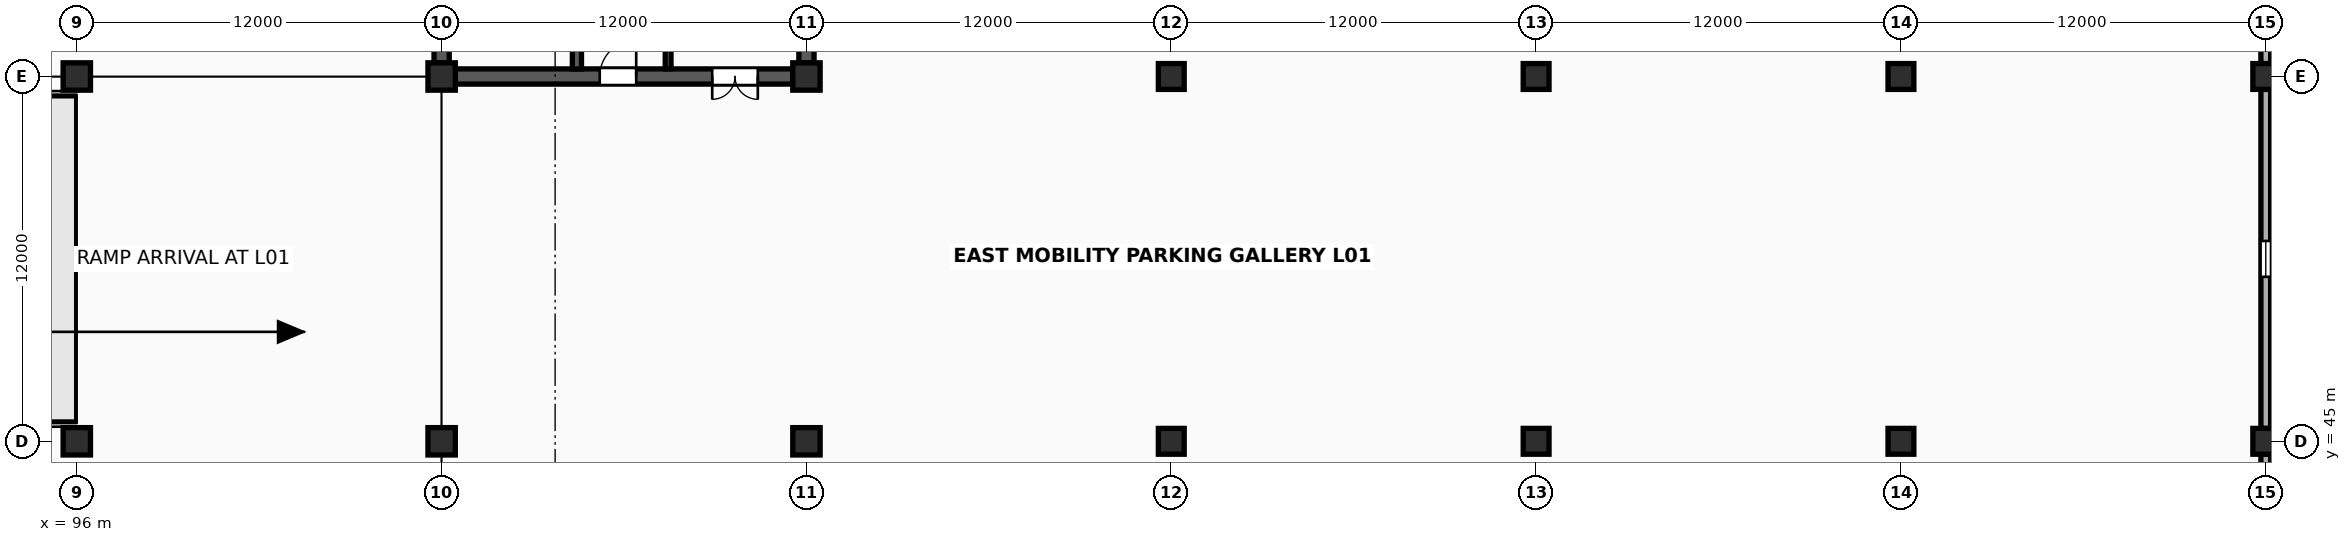
"""IFC4 building model, lengths in metres.
Left out: names, types, materials, properties, quantities, classifications, styles, units other than length and angle.
Written with IfcOpenShell. Run it as: python <this file> out.ifc"""

import sys

from ifc_helpers import new_model, si_unit, direction, frame, frame_2d, origin, origin_2d, place, context, subcontext, project, spatial, rectangle, extrude, element, fill, save


model = new_model("IFC4")
c1 = context("Model", 3, precision=1e-05, world=origin(), true_north=direction((0.0, 1.0)))
c2 = subcontext(c1, "Body", "Model", "MODEL_VIEW")
j1 = project(units=[si_unit("LENGTHUNIT", "METRE"), si_unit("PLANEANGLEUNIT", "RADIAN")], contexts=[c1])
p1 = place(None, origin())
s1 = spatial("IfcSite", under=j1, at=p1, CompositionType="ELEMENT")
p2 = place(p1, origin())
s2 = spatial("IfcBuilding", under=s1, at=p2, CompositionType="ELEMENT")
p3 = place(p2, frame((0.0, 0.0, 5.4)))
s3 = spatial("IfcBuildingStorey", under=s2, at=p3, CompositionType="ELEMENT", Elevation=5.4)
for number, where, z_axis, x_axis in (
    (1, (96.0, 45.0, 0.0), (0.0, 0.0, 1.0), (1.0, 0.0, 0.0)),
    (2, (96.0, 57.0, 0.0), (0.0, 0.0, 1.0), (1.0, 0.0, 0.0)),
    (3, (108.0, 45.0, 0.0), (0.0, 0.0, 1.0), (1.0, 0.0, 0.0)),
    (4, (108.0, 57.0, 0.0), (0.0, 0.0, 1.0), (1.0, 0.0, 0.0)),
    (5, (120.0, 45.0, 0.0), (0.0, 0.0, 1.0), (1.0, 0.0, 0.0)),
    (6, (120.0, 57.0, 0.0), (0.0, 0.0, 1.0), (1.0, 0.0, 0.0)),
):
    element("IfcColumn", number, at=place(p3, frame(where, z_axis=z_axis, x_axis=x_axis)), inside=s3, PredefinedType="COLUMN", context=c2, shape_type="SweptSolid", body=[
        extrude(rectangle(XDim=0.9, YDim=0.9, at=origin_2d()), origin(), (0.0, 0.0, 1.0), 4.2),
    ])
for number, where, z_axis, x_axis in (
    (7, (132.0, 45.0, 0.0), (0.0, 0.0, 1.0), (1.0, 0.0, 0.0)),
    (8, (132.0, 57.0, 0.0), (0.0, 0.0, 1.0), (1.0, 0.0, 0.0)),
    (9, (144.0, 45.0, 0.0), (0.0, 0.0, 1.0), (1.0, 0.0, 0.0)),
    (10, (144.0, 57.0, 0.0), (0.0, 0.0, 1.0), (1.0, 0.0, 0.0)),
    (11, (156.0, 45.0, 0.0), (0.0, 0.0, 1.0), (1.0, 0.0, 0.0)),
    (12, (156.0, 57.0, 0.0), (0.0, 0.0, 1.0), (1.0, 0.0, 0.0)),
    (13, (168.0, 45.0, 0.0), (0.0, 0.0, 1.0), (1.0, 0.0, 0.0)),
    (14, (168.0, 57.0, 0.0), (0.0, 0.0, 1.0), (1.0, 0.0, 0.0)),
):
    element("IfcColumn", number, at=place(p3, frame(where, z_axis=z_axis, x_axis=x_axis)), inside=s3, PredefinedType="COLUMN", context=c2, shape_type="SweptSolid", body=[
        extrude(rectangle(XDim=0.85, YDim=0.85, at=origin_2d()), origin(), (0.0, 0.0, 1.0), 4.2),
    ])
p4 = place(p3, frame((108.447, 57.0, 0.0), z_axis=(0.0, 0.0, 1.0), x_axis=(1.0, 0.0, 0.0)))
e15 = element("IfcWall", 15, at=p4, inside=s3, PredefinedType="SHEAR", context=c2, shape_type="SweptSolid", body=[
    extrude(rectangle(XDim=11.106, YDim=0.5, at=frame_2d((5.553, 0.0))), origin(), (0.0, 0.0, 1.0), 4.043),
])
p5 = place(p4, frame((4.753, 0.0, 0.0)))
e16 = element("IfcOpeningElement", 16, at=p5, cuts=e15, PredefinedType="OPENING", context=c2, shape_type="SweptSolid", body=[
    extrude(rectangle(XDim=1.2, YDim=2.2, at=frame_2d((0.6, 1.1))), frame((0.0, 0.265, 0.0), z_axis=(0.0, -1.0, 0.0), x_axis=(1.0, 0.0, 0.0)), (0.0, 0.0, 1.0), 0.53),
])
p6 = place(p4, frame((8.453, 0.0, 0.0)))
e17 = element("IfcOpeningElement", 17, at=p6, cuts=e15, PredefinedType="OPENING", context=c2, shape_type="SweptSolid", body=[
    extrude(rectangle(XDim=1.5, YDim=2.25, at=frame_2d((0.75, 1.125))), frame((0.0, 0.265, 0.0), z_axis=(0.0, -1.0, 0.0), x_axis=(1.0, 0.0, 0.0)), (0.0, 0.0, 1.0), 0.53),
])
for number, where, z_axis, x_axis in (
    (18, (108.0, 57.447, 0.0), (0.0, 0.0, 1.0), (0.0, 1.0, 0.0)),
    (19, (120.0, 57.447, 0.0), (0.0, 0.0, 1.0), (0.0, 1.0, 0.0)),
):
    element("IfcWall", number, at=place(p3, frame(where, z_axis=z_axis, x_axis=x_axis)), inside=s3, PredefinedType="SHEAR", context=c2, shape_type="SweptSolid", body=[
        extrude(rectangle(XDim=11.106, YDim=0.5, at=frame_2d((5.553, 0.0))), origin(), (0.0, 0.0, 1.0), 4.043),
    ])
p7 = place(p3, frame((112.45, 57.247, 0.0), z_axis=(0.0, 0.0, 1.0), x_axis=(0.0, 1.0, 0.0)))
e20 = element("IfcWall", 20, at=p7, inside=s3, PredefinedType="SHEAR", context=c2, shape_type="SweptSolid", body=[
    extrude(rectangle(XDim=11.506, YDim=0.3, at=frame_2d((5.753, 0.0))), origin(), (0.0, 0.0, 1.0), 4.043),
])
p8 = place(p7, frame((0.9, 0.0, 0.0)))
e21 = element("IfcOpeningElement", 21, at=p8, cuts=e20, PredefinedType="OPENING", context=c2, shape_type="SweptSolid", body=[
    extrude(rectangle(XDim=1.1, YDim=2.2, at=frame_2d((0.55, 1.1))), frame((0.0, 0.165, 0.0), z_axis=(0.0, -1.0, 0.0), x_axis=(1.0, 0.0, 0.0)), (0.0, 0.0, 1.0), 0.33),
])
p9 = place(p3, frame((115.45, 57.25, 0.0), z_axis=(0.0, 0.0, 1.0), x_axis=(0.0, 1.0, 0.0)))
e22 = element("IfcWall", 22, at=p9, inside=s3, PredefinedType="SOLIDWALL", context=c2, shape_type="SweptSolid", body=[
    extrude(rectangle(XDim=8.43, YDim=0.19, at=frame_2d((4.215, 0.0))), origin(), (0.0, 0.0, 1.0), 4.033),
])
p10 = place(p9, frame((3.6, 0.0, 0.0)))
e23 = element("IfcOpeningElement", 23, at=p10, cuts=e22, PredefinedType="OPENING", context=c2, shape_type="SweptSolid", body=[
    extrude(rectangle(XDim=1.04, YDim=2.18, at=frame_2d((0.52, 1.09))), frame((0.0, 0.11, 0.0), z_axis=(0.0, -1.0, 0.0), x_axis=(1.0, 0.0, 0.0)), (0.0, 0.0, 1.0), 0.22),
])
p11 = place(p3, frame((168.0, 36.473, 0.0), z_axis=(0.0, 0.0, 1.0), x_axis=(0.0, 1.0, 0.0)))
e24 = element("IfcWall", 24, at=p11, inside=s3, PredefinedType="SOLIDWALL", context=c2, shape_type="SweptSolid", body=[
    extrude(rectangle(XDim=8.104, YDim=0.32, at=frame_2d((4.052, 0.0))), origin(), (0.0, 0.0, 1.0), 2.69),
])
p12 = place(p11, frame((2.812, 0.0, 0.55)))
e25 = element("IfcOpeningElement", 25, at=p12, cuts=e24, PredefinedType="OPENING", context=c2, shape_type="SweptSolid", body=[
    extrude(rectangle(XDim=2.48, YDim=1.42, at=frame_2d((1.24, 0.71))), frame((0.0, 0.175, 0.0), z_axis=(0.0, -1.0, 0.0), x_axis=(1.0, 0.0, 0.0)), (0.0, 0.0, 1.0), 0.35),
])
p13 = place(p3, frame((168.0, 45.423, 0.0), z_axis=(0.0, 0.0, 1.0), x_axis=(0.0, 1.0, 0.0)))
e26 = element("IfcWall", 26, at=p13, inside=s3, PredefinedType="SOLIDWALL", context=c2, shape_type="SweptSolid", body=[
    extrude(rectangle(XDim=11.154, YDim=0.32, at=frame_2d((5.577, 0.0))), origin(), (0.0, 0.0, 1.0), 2.69),
])
p14 = place(p13, frame((4.987, 0.0, 0.55)))
e27 = element("IfcOpeningElement", 27, at=p14, cuts=e26, PredefinedType="OPENING", context=c2, shape_type="SweptSolid", body=[
    extrude(rectangle(XDim=1.18, YDim=1.58, at=frame_2d((0.59, 0.79))), frame((0.0, 0.175, 0.0), z_axis=(0.0, -1.0, 0.0), x_axis=(1.0, 0.0, 0.0)), (0.0, 0.0, 1.0), 0.35),
])
p15 = place(p3, frame((168.0, 57.423, 0.0), z_axis=(0.0, 0.0, 1.0), x_axis=(0.0, 1.0, 0.0)))
e28 = element("IfcWall", 28, at=p15, inside=s3, PredefinedType="SOLIDWALL", context=c2, shape_type="SweptSolid", body=[
    extrude(rectangle(XDim=11.154, YDim=0.32, at=frame_2d((5.577, 0.0))), origin(), (0.0, 0.0, 1.0), 2.69),
])
p16 = place(p15, frame((4.907, 0.0, 0.55)))
e29 = element("IfcOpeningElement", 29, at=p16, cuts=e28, PredefinedType="OPENING", context=c2, shape_type="SweptSolid", body=[
    extrude(rectangle(XDim=1.34, YDim=1.58, at=frame_2d((0.67, 0.79))), frame((0.0, 0.175, 0.0), z_axis=(0.0, -1.0, 0.0), x_axis=(1.0, 0.0, 0.0)), (0.0, 0.0, 1.0), 0.35),
])
p17 = place(p14, origin())
e30 = element("IfcWindow", 30, at=p17, inside=s3, PartitioningType="SINGLE_PANEL", PredefinedType="WINDOW", context=c2, shape_type="SweptSolid", body=[
    extrude(rectangle(XDim=1.18, YDim=1.58, at=frame_2d((0.59, 0.79))), frame((0.0, 0.03, 0.0), z_axis=(0.0, -1.0, 0.0), x_axis=(1.0, 0.0, 0.0)), (0.0, 0.0, 1.0), 0.06),
])
fill(e27, e30)
p18 = place(p5, origin())
e31 = element("IfcDoor", 31, at=p18, inside=s3, OperationType="SINGLE_SWING_RIGHT", PredefinedType="DOOR", context=c2, shape_type="SweptSolid", body=[
    extrude(rectangle(XDim=1.2, YDim=2.2, at=frame_2d((0.6, 1.1))), frame((0.0, 0.025, 0.0), z_axis=(0.0, -1.0, 0.0), x_axis=(1.0, 0.0, 0.0)), (0.0, 0.0, 1.0), 0.05),
])
fill(e16, e31)
p19 = place(p6, origin())
e32 = element("IfcDoor", 32, at=p19, inside=s3, OperationType="DOUBLE_DOOR_SINGLE_SWING", PredefinedType="DOOR", context=c2, shape_type="SweptSolid", body=[
    extrude(rectangle(XDim=1.5, YDim=2.25, at=frame_2d((0.75, 1.125))), frame((0.0, 0.025, 0.0), z_axis=(0.0, -1.0, 0.0), x_axis=(1.0, 0.0, 0.0)), (0.0, 0.0, 1.0), 0.05),
])
fill(e17, e32)
save(model, sys.argv[1])
